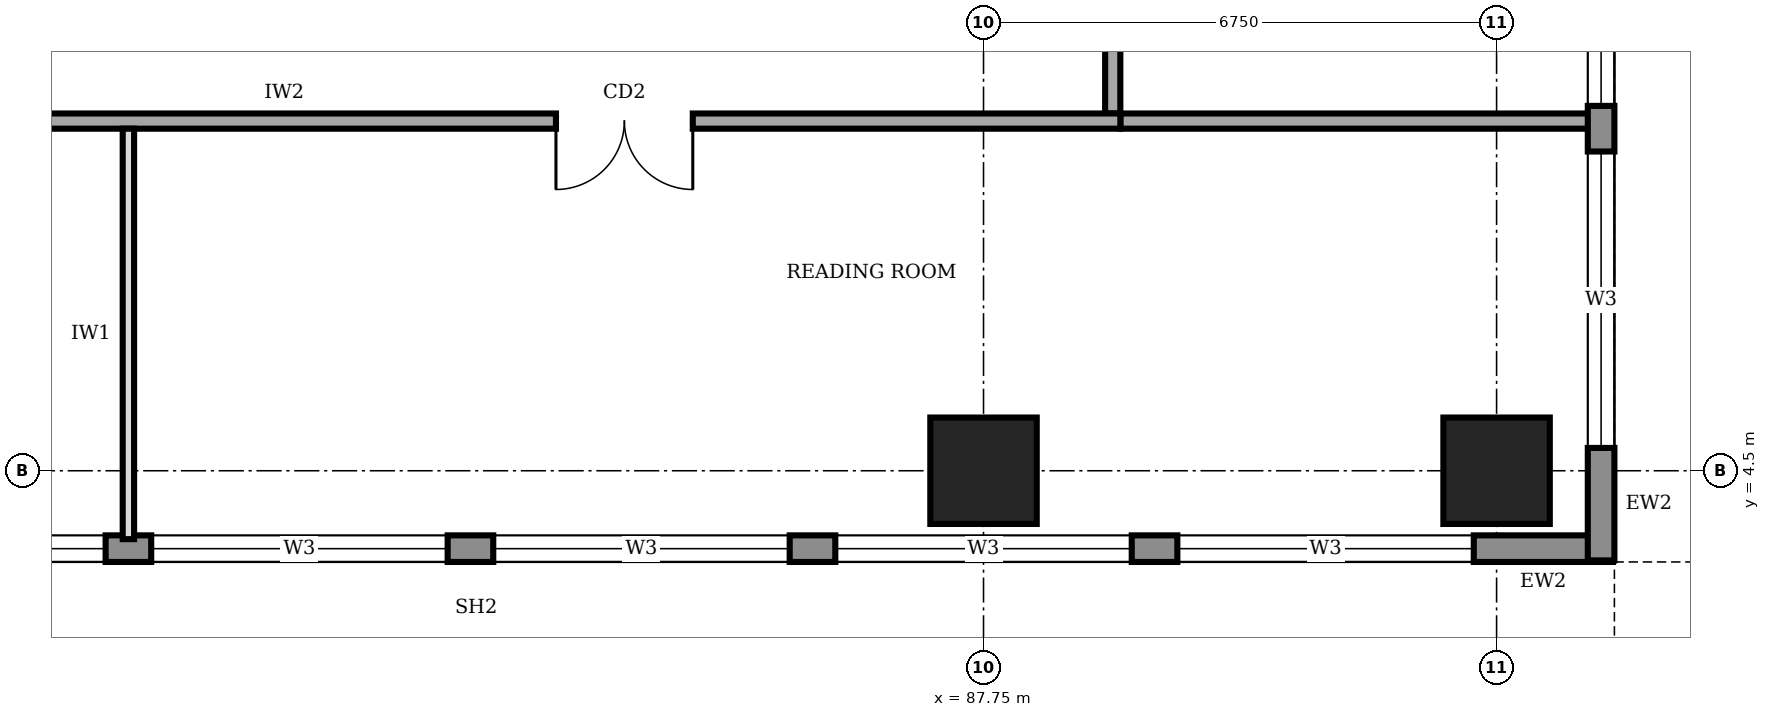
"""IFC4 building model, lengths in metres.
Left out: names, types, materials, properties, quantities, classifications, styles, units other than length and angle.
Written with IfcOpenShell. Run it as: python <this file> out.ifc"""

import sys

from ifc_helpers import new_model, si_unit, direction, frame, frame_2d, origin, origin_2d, place, context, subcontext, project, spatial, rectangle, extrude, element, fill, save


model = new_model("IFC4")
c1 = context("Model", 3, precision=1e-05, world=origin(), true_north=direction((0.0, 1.0)))
c2 = subcontext(c1, "Body", "Model", "MODEL_VIEW")
j1 = project(units=[si_unit("LENGTHUNIT", "METRE"), si_unit("PLANEANGLEUNIT", "RADIAN")], contexts=[c1])
p1 = place(None, origin())
s1 = spatial("IfcSite", under=j1, at=p1, CompositionType="ELEMENT")
p2 = place(p1, origin())
s2 = spatial("IfcBuilding", under=s1, at=p2, CompositionType="ELEMENT")
p3 = place(p2, frame((0.0, 0.0, 185.0)))
s3 = spatial("IfcBuildingStorey", under=s2, at=p3, CompositionType="ELEMENT", Elevation=185.0)
for number, where, z_axis, x_axis in (
    (1, (87.75, 4.5, 0.0), (0.0, 0.0, 1.0), (1.0, 0.0, 0.0)),
    (2, (94.5, 4.5, 0.0), (0.0, 0.0, 1.0), (1.0, 0.0, 0.0)),
):
    element("IfcColumn", number, at=place(p3, frame(where, z_axis=z_axis, x_axis=x_axis)), inside=s3, PredefinedType="COLUMN", context=c2, shape_type="SweptSolid", body=[
        extrude(rectangle(XDim=1.4, YDim=1.4, at=origin_2d()), origin(), (0.0, 0.0, 1.0), 4.0),
    ])
p4 = place(p3, frame((66.12, 3.475, 0.0), z_axis=(0.0, 0.0, 1.0), x_axis=(1.0, 0.0, 0.0)))
e3 = element("IfcWall", 3, at=p4, inside=s3, PredefinedType="STANDARD", context=c2, shape_type="SweptSolid", body=[
    extrude(rectangle(XDim=29.91, YDim=0.35, at=frame_2d((14.955, 0.0))), origin(), (0.0, 0.0, 1.0), 3.75),
])
p5 = place(p4, frame((1.68, 0.0, 0.95)))
e4 = element("IfcOpeningElement", 4, at=p5, cuts=e3, PredefinedType="OPENING", context=c2, shape_type="SweptSolid", body=[
    extrude(rectangle(XDim=3.9, YDim=1.8, at=frame_2d((1.95, 0.9))), frame((0.0, 0.185, 0.0), z_axis=(0.0, -1.0, 0.0), x_axis=(1.0, 0.0, 0.0)), (0.0, 0.0, 1.0), 0.37),
])
p6 = place(p4, frame((6.18, 0.0, 0.95)))
e5 = element("IfcOpeningElement", 5, at=p6, cuts=e3, PredefinedType="OPENING", context=c2, shape_type="SweptSolid", body=[
    extrude(rectangle(XDim=3.9, YDim=1.8, at=frame_2d((1.95, 0.9))), frame((0.0, 0.185, 0.0), z_axis=(0.0, -1.0, 0.0), x_axis=(1.0, 0.0, 0.0)), (0.0, 0.0, 1.0), 0.37),
])
p7 = place(p4, frame((10.68, 0.0, 0.95)))
e6 = element("IfcOpeningElement", 6, at=p7, cuts=e3, PredefinedType="OPENING", context=c2, shape_type="SweptSolid", body=[
    extrude(rectangle(XDim=3.9, YDim=1.8, at=frame_2d((1.95, 0.9))), frame((0.0, 0.185, 0.0), z_axis=(0.0, -1.0, 0.0), x_axis=(1.0, 0.0, 0.0)), (0.0, 0.0, 1.0), 0.37),
])
p8 = place(p4, frame((15.18, 0.0, 0.95)))
e7 = element("IfcOpeningElement", 7, at=p8, cuts=e3, PredefinedType="OPENING", context=c2, shape_type="SweptSolid", body=[
    extrude(rectangle(XDim=3.9, YDim=1.8, at=frame_2d((1.95, 0.9))), frame((0.0, 0.185, 0.0), z_axis=(0.0, -1.0, 0.0), x_axis=(1.0, 0.0, 0.0)), (0.0, 0.0, 1.0), 0.37),
])
p9 = place(p4, frame((19.68, 0.0, 0.95)))
e8 = element("IfcOpeningElement", 8, at=p9, cuts=e3, PredefinedType="OPENING", context=c2, shape_type="SweptSolid", body=[
    extrude(rectangle(XDim=3.9, YDim=1.8, at=frame_2d((1.95, 0.9))), frame((0.0, 0.185, 0.0), z_axis=(0.0, -1.0, 0.0), x_axis=(1.0, 0.0, 0.0)), (0.0, 0.0, 1.0), 0.37),
])
p10 = place(p4, frame((24.18, 0.0, 0.95)))
e9 = element("IfcOpeningElement", 9, at=p10, cuts=e3, PredefinedType="OPENING", context=c2, shape_type="SweptSolid", body=[
    extrude(rectangle(XDim=3.9, YDim=1.8, at=frame_2d((1.95, 0.9))), frame((0.0, 0.185, 0.0), z_axis=(0.0, -1.0, 0.0), x_axis=(1.0, 0.0, 0.0)), (0.0, 0.0, 1.0), 0.37),
])
p11 = place(p3, frame((95.875, 3.32, 0.0), z_axis=(0.0, 0.0, 1.0), x_axis=(0.0, 1.0, 0.0)))
e10 = element("IfcWall", 10, at=p11, inside=s3, PredefinedType="STANDARD", context=c2, shape_type="SweptSolid", body=[
    extrude(rectangle(XDim=33.86, YDim=0.35, at=frame_2d((16.93, 0.0))), origin(), (0.0, 0.0, 1.0), 3.75),
])
p12 = place(p11, frame((1.48, 0.0, 0.95)))
e11 = element("IfcOpeningElement", 11, at=p12, cuts=e10, PredefinedType="OPENING", context=c2, shape_type="SweptSolid", body=[
    extrude(rectangle(XDim=3.9, YDim=1.8, at=frame_2d((1.95, 0.9))), frame((0.0, 0.185, 0.0), z_axis=(0.0, -1.0, 0.0), x_axis=(1.0, 0.0, 0.0)), (0.0, 0.0, 1.0), 0.37),
])
p13 = place(p11, frame((5.98, 0.0, 0.95)))
e12 = element("IfcOpeningElement", 12, at=p13, cuts=e10, PredefinedType="OPENING", context=c2, shape_type="SweptSolid", body=[
    extrude(rectangle(XDim=3.9, YDim=1.8, at=frame_2d((1.95, 0.9))), frame((0.0, 0.185, 0.0), z_axis=(0.0, -1.0, 0.0), x_axis=(1.0, 0.0, 0.0)), (0.0, 0.0, 1.0), 0.37),
])
p14 = place(p11, frame((10.48, 0.0, 0.95)))
e13 = element("IfcOpeningElement", 13, at=p14, cuts=e10, PredefinedType="OPENING", context=c2, shape_type="SweptSolid", body=[
    extrude(rectangle(XDim=3.9, YDim=1.8, at=frame_2d((1.95, 0.9))), frame((0.0, 0.185, 0.0), z_axis=(0.0, -1.0, 0.0), x_axis=(1.0, 0.0, 0.0)), (0.0, 0.0, 1.0), 0.37),
])
p15 = place(p11, frame((14.98, 0.0, 0.95)))
e14 = element("IfcOpeningElement", 14, at=p15, cuts=e10, PredefinedType="OPENING", context=c2, shape_type="SweptSolid", body=[
    extrude(rectangle(XDim=3.9, YDim=1.8, at=frame_2d((1.95, 0.9))), frame((0.0, 0.185, 0.0), z_axis=(0.0, -1.0, 0.0), x_axis=(1.0, 0.0, 0.0)), (0.0, 0.0, 1.0), 0.37),
])
p16 = place(p11, frame((19.48, 0.0, 0.95)))
e15 = element("IfcOpeningElement", 15, at=p16, cuts=e10, PredefinedType="OPENING", context=c2, shape_type="SweptSolid", body=[
    extrude(rectangle(XDim=3.9, YDim=1.8, at=frame_2d((1.95, 0.9))), frame((0.0, 0.185, 0.0), z_axis=(0.0, -1.0, 0.0), x_axis=(1.0, 0.0, 0.0)), (0.0, 0.0, 1.0), 0.37),
])
p17 = place(p11, frame((23.98, 0.0, 0.95)))
e16 = element("IfcOpeningElement", 16, at=p17, cuts=e10, PredefinedType="OPENING", context=c2, shape_type="SweptSolid", body=[
    extrude(rectangle(XDim=3.9, YDim=1.8, at=frame_2d((1.95, 0.9))), frame((0.0, 0.185, 0.0), z_axis=(0.0, -1.0, 0.0), x_axis=(1.0, 0.0, 0.0)), (0.0, 0.0, 1.0), 0.37),
])
p18 = place(p11, frame((28.48, 0.0, 0.95)))
e17 = element("IfcOpeningElement", 17, at=p18, cuts=e10, PredefinedType="OPENING", context=c2, shape_type="SweptSolid", body=[
    extrude(rectangle(XDim=3.9, YDim=1.8, at=frame_2d((1.95, 0.9))), frame((0.0, 0.185, 0.0), z_axis=(0.0, -1.0, 0.0), x_axis=(1.0, 0.0, 0.0)), (0.0, 0.0, 1.0), 0.37),
])
p19 = place(p3, frame((72.65, 9.1, 0.0), z_axis=(0.0, 0.0, 1.0), x_axis=(1.0, 0.0, 0.0)))
e18 = element("IfcWall", 18, at=p19, inside=s3, PredefinedType="SOLIDWALL", context=c2, shape_type="SweptSolid", body=[
    extrude(rectangle(XDim=16.9, YDim=0.2, at=frame_2d((8.45, 0.0))), origin(), (0.0, 0.0, 1.0), 3.75),
])
p20 = place(p19, frame((1.325, 0.0, 0.0)))
e19 = element("IfcOpeningElement", 19, at=p20, cuts=e18, PredefinedType="OPENING", context=c2, shape_type="SweptSolid", body=[
    extrude(rectangle(XDim=1.0, YDim=2.1, at=frame_2d((0.5, 1.05))), frame((0.0, 0.11, 0.0), z_axis=(0.0, -1.0, 0.0), x_axis=(1.0, 0.0, 0.0)), (0.0, 0.0, 1.0), 0.22),
])
p21 = place(p19, frame((9.475, 0.0, 0.0)))
e20 = element("IfcOpeningElement", 20, at=p21, cuts=e18, PredefinedType="OPENING", context=c2, shape_type="SweptSolid", body=[
    extrude(rectangle(XDim=1.8, YDim=2.1, at=frame_2d((0.9, 1.05))), frame((0.0, 0.11, 0.0), z_axis=(0.0, -1.0, 0.0), x_axis=(1.0, 0.0, 0.0)), (0.0, 0.0, 1.0), 0.22),
])
p22 = place(p3, frame((89.45, 9.2, 0.0), z_axis=(0.0, 0.0, 1.0), x_axis=(0.0, 1.0, 0.0)))
e21 = element("IfcWall", 21, at=p22, inside=s3, PredefinedType="SOLIDWALL", context=c2, shape_type="SweptSolid", body=[
    extrude(rectangle(XDim=23.05, YDim=0.2, at=frame_2d((11.525, 0.0))), origin(), (0.0, 0.0, 1.0), 3.75),
])
p23 = place(p22, frame((1.55, 0.0, 0.0)))
e22 = element("IfcOpeningElement", 22, at=p23, cuts=e21, PredefinedType="OPENING", context=c2, shape_type="SweptSolid", body=[
    extrude(rectangle(XDim=1.0, YDim=2.1, at=frame_2d((0.5, 1.05))), frame((0.0, 0.11, 0.0), z_axis=(0.0, -1.0, 0.0), x_axis=(1.0, 0.0, 0.0)), (0.0, 0.0, 1.0), 0.22),
])
p24 = place(p22, frame((4.9, 0.0, 0.0)))
e23 = element("IfcOpeningElement", 23, at=p24, cuts=e21, PredefinedType="OPENING", context=c2, shape_type="SweptSolid", body=[
    extrude(rectangle(XDim=1.0, YDim=2.1, at=frame_2d((0.5, 1.05))), frame((0.0, 0.11, 0.0), z_axis=(0.0, -1.0, 0.0), x_axis=(1.0, 0.0, 0.0)), (0.0, 0.0, 1.0), 0.22),
])
p25 = place(p22, frame((8.0, 0.0, 0.0)))
e24 = element("IfcOpeningElement", 24, at=p25, cuts=e21, PredefinedType="OPENING", context=c2, shape_type="SweptSolid", body=[
    extrude(rectangle(XDim=0.9, YDim=2.1, at=frame_2d((0.45, 1.05))), frame((0.0, 0.11, 0.0), z_axis=(0.0, -1.0, 0.0), x_axis=(1.0, 0.0, 0.0)), (0.0, 0.0, 1.0), 0.22),
])
p26 = place(p22, frame((11.05, 0.0, 0.0)))
e25 = element("IfcOpeningElement", 25, at=p26, cuts=e21, PredefinedType="OPENING", context=c2, shape_type="SweptSolid", body=[
    extrude(rectangle(XDim=0.9, YDim=2.1, at=frame_2d((0.45, 1.05))), frame((0.0, 0.11, 0.0), z_axis=(0.0, -1.0, 0.0), x_axis=(1.0, 0.0, 0.0)), (0.0, 0.0, 1.0), 0.22),
])
p27 = place(p22, frame((15.75, 0.0, 0.0)))
e26 = element("IfcOpeningElement", 26, at=p27, cuts=e21, PredefinedType="OPENING", context=c2, shape_type="SweptSolid", body=[
    extrude(rectangle(XDim=0.9, YDim=2.1, at=frame_2d((0.45, 1.05))), frame((0.0, 0.11, 0.0), z_axis=(0.0, -1.0, 0.0), x_axis=(1.0, 0.0, 0.0)), (0.0, 0.0, 1.0), 0.22),
])
p28 = place(p22, frame((13.1, 0.0, 0.0)))
e27 = element("IfcOpeningElement", 27, at=p28, cuts=e21, PredefinedType="OPENING", context=c2, shape_type="SweptSolid", body=[
    extrude(rectangle(XDim=1.0, YDim=2.1, at=frame_2d((0.5, 1.05))), frame((0.0, 0.11, 0.0), z_axis=(0.0, -1.0, 0.0), x_axis=(1.0, 0.0, 0.0)), (0.0, 0.0, 1.0), 0.22),
])
p29 = place(p22, frame((19.925, 0.0, 0.0)))
e28 = element("IfcOpeningElement", 28, at=p29, cuts=e21, PredefinedType="OPENING", context=c2, shape_type="SweptSolid", body=[
    extrude(rectangle(XDim=1.0, YDim=2.1, at=frame_2d((0.5, 1.05))), frame((0.0, 0.11, 0.0), z_axis=(0.0, -1.0, 0.0), x_axis=(1.0, 0.0, 0.0)), (0.0, 0.0, 1.0), 0.22),
])
p30 = place(p3, frame((89.55, 9.1, 0.0), z_axis=(0.0, 0.0, 1.0), x_axis=(1.0, 0.0, 0.0)))
e29 = element("IfcWall", 29, at=p30, inside=s3, PredefinedType="SOLIDWALL", context=c2, shape_type="SweptSolid", body=[
    extrude(rectangle(XDim=6.2, YDim=0.2, at=frame_2d((3.1, 0.0))), origin(), (0.0, 0.0, 1.0), 3.75),
])
p31 = place(p3, frame((76.5, 3.6, 0.0), z_axis=(0.0, 0.0, 1.0), x_axis=(0.0, 1.0, 0.0)))
e30 = element("IfcWall", 30, at=p31, inside=s3, PredefinedType="PARTITIONING", context=c2, shape_type="SweptSolid", body=[
    extrude(rectangle(XDim=5.4, YDim=0.15, at=frame_2d((2.7, 0.0))), origin(), (0.0, 0.0, 1.0), 3.75),
])
p32 = place(p6, origin())
e31 = element("IfcWindow", 31, at=p32, inside=s3, PartitioningType="SINGLE_PANEL", PredefinedType="WINDOW", context=c2, shape_type="SweptSolid", body=[
    extrude(rectangle(XDim=3.9, YDim=1.8, at=frame_2d((1.95, 0.9))), frame((0.0, 0.03, 0.0), z_axis=(0.0, -1.0, 0.0), x_axis=(1.0, 0.0, 0.0)), (0.0, 0.0, 1.0), 0.06),
])
fill(e5, e31)
p33 = place(p7, origin())
e32 = element("IfcWindow", 32, at=p33, inside=s3, PartitioningType="SINGLE_PANEL", PredefinedType="WINDOW", context=c2, shape_type="SweptSolid", body=[
    extrude(rectangle(XDim=3.9, YDim=1.8, at=frame_2d((1.95, 0.9))), frame((0.0, 0.03, 0.0), z_axis=(0.0, -1.0, 0.0), x_axis=(1.0, 0.0, 0.0)), (0.0, 0.0, 1.0), 0.06),
])
fill(e6, e32)
p34 = place(p8, origin())
e33 = element("IfcWindow", 33, at=p34, inside=s3, PartitioningType="SINGLE_PANEL", PredefinedType="WINDOW", context=c2, shape_type="SweptSolid", body=[
    extrude(rectangle(XDim=3.9, YDim=1.8, at=frame_2d((1.95, 0.9))), frame((0.0, 0.03, 0.0), z_axis=(0.0, -1.0, 0.0), x_axis=(1.0, 0.0, 0.0)), (0.0, 0.0, 1.0), 0.06),
])
fill(e7, e33)
p35 = place(p9, origin())
e34 = element("IfcWindow", 34, at=p35, inside=s3, PartitioningType="SINGLE_PANEL", PredefinedType="WINDOW", context=c2, shape_type="SweptSolid", body=[
    extrude(rectangle(XDim=3.9, YDim=1.8, at=frame_2d((1.95, 0.9))), frame((0.0, 0.03, 0.0), z_axis=(0.0, -1.0, 0.0), x_axis=(1.0, 0.0, 0.0)), (0.0, 0.0, 1.0), 0.06),
])
fill(e8, e34)
p36 = place(p10, origin())
e35 = element("IfcWindow", 35, at=p36, inside=s3, PartitioningType="SINGLE_PANEL", PredefinedType="WINDOW", context=c2, shape_type="SweptSolid", body=[
    extrude(rectangle(XDim=3.9, YDim=1.8, at=frame_2d((1.95, 0.9))), frame((0.0, 0.03, 0.0), z_axis=(0.0, -1.0, 0.0), x_axis=(1.0, 0.0, 0.0)), (0.0, 0.0, 1.0), 0.06),
])
fill(e9, e35)
p37 = place(p12, origin())
e36 = element("IfcWindow", 36, at=p37, inside=s3, PartitioningType="SINGLE_PANEL", PredefinedType="WINDOW", context=c2, shape_type="SweptSolid", body=[
    extrude(rectangle(XDim=3.9, YDim=1.8, at=frame_2d((1.95, 0.9))), frame((0.0, 0.03, 0.0), z_axis=(0.0, -1.0, 0.0), x_axis=(1.0, 0.0, 0.0)), (0.0, 0.0, 1.0), 0.06),
])
fill(e11, e36)
p38 = place(p13, origin())
e37 = element("IfcWindow", 37, at=p38, inside=s3, PartitioningType="SINGLE_PANEL", PredefinedType="WINDOW", context=c2, shape_type="SweptSolid", body=[
    extrude(rectangle(XDim=3.9, YDim=1.8, at=frame_2d((1.95, 0.9))), frame((0.0, 0.03, 0.0), z_axis=(0.0, -1.0, 0.0), x_axis=(1.0, 0.0, 0.0)), (0.0, 0.0, 1.0), 0.06),
])
fill(e12, e37)
p39 = place(p21, frame((1.8, 0.0, 0.0), z_axis=(0.0, 0.0, 1.0), x_axis=(-1.0, 0.0, 0.0)))
e38 = element("IfcDoor", 38, at=p39, inside=s3, OperationType="DOUBLE_DOOR_SINGLE_SWING", PredefinedType="DOOR", context=c2, shape_type="SweptSolid", body=[
    extrude(rectangle(XDim=1.8, YDim=2.1, at=frame_2d((0.9, 1.05))), frame((0.0, 0.025, 0.0), z_axis=(0.0, -1.0, 0.0), x_axis=(1.0, 0.0, 0.0)), (0.0, 0.0, 1.0), 0.05),
])
fill(e20, e38)
save(model, sys.argv[1])
